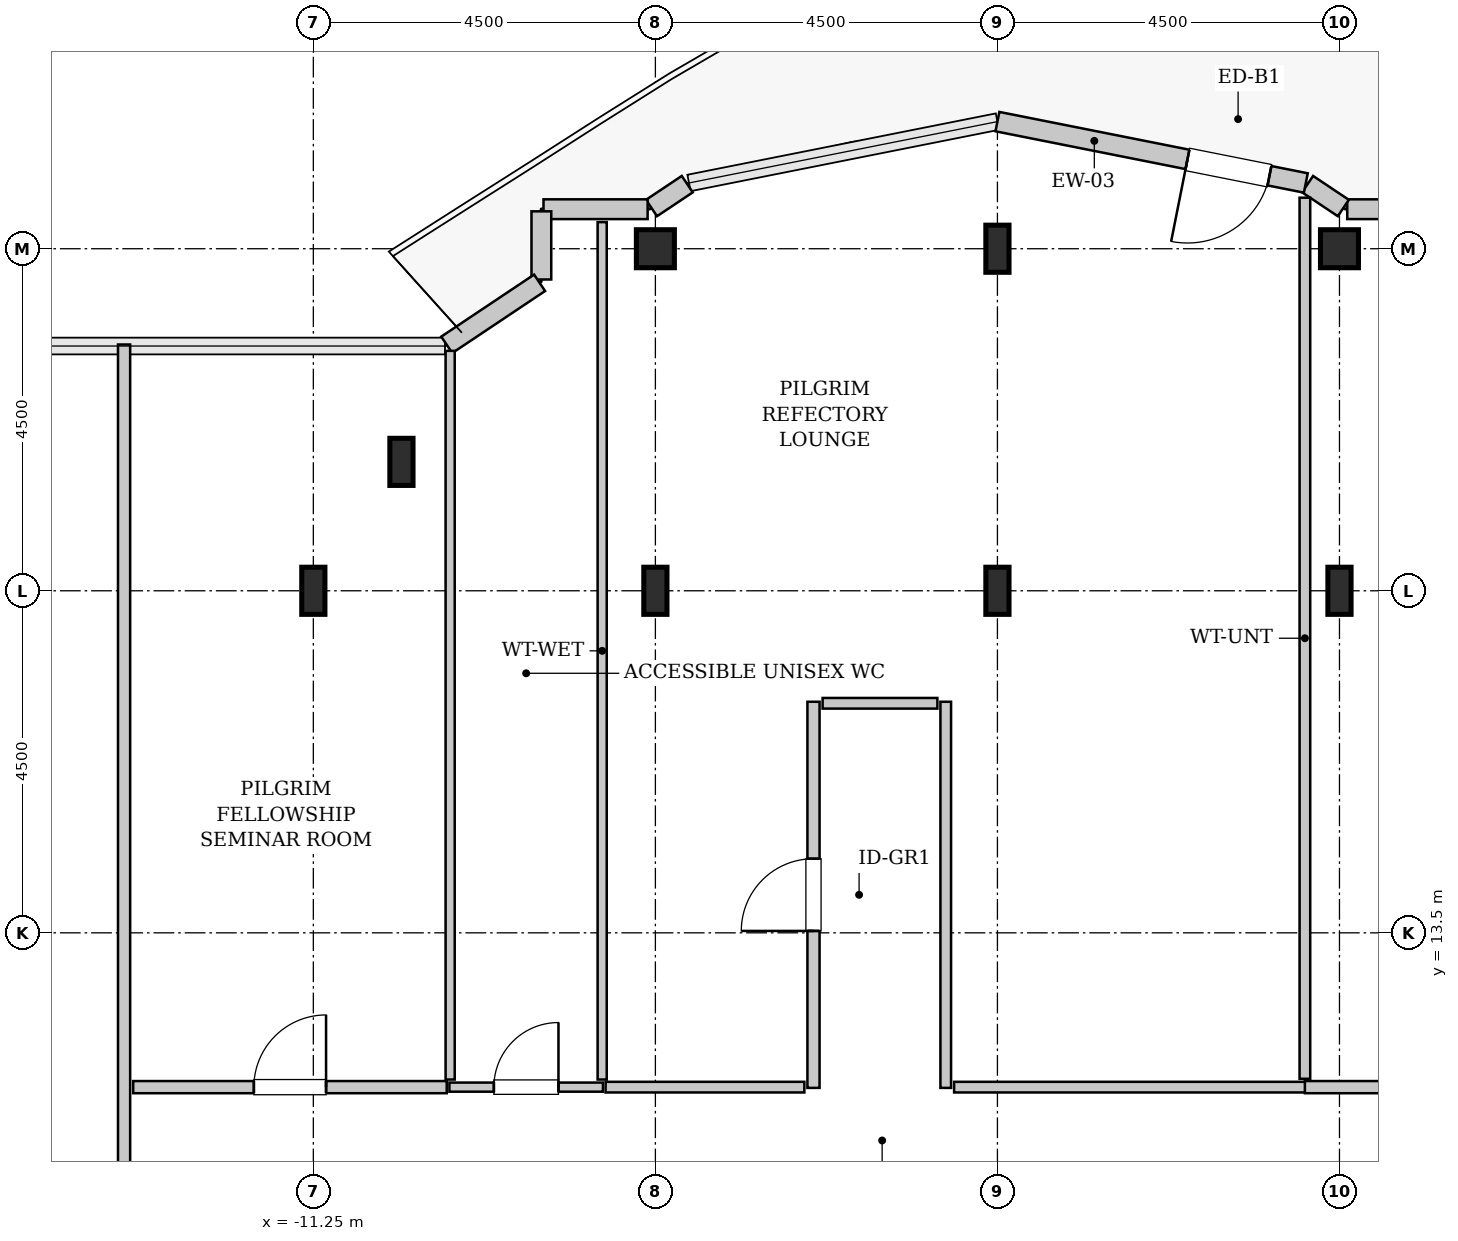
"""IFC4 building model, lengths in metres.
Left out: names, types, materials, properties, quantities, classifications, styles, units other than length and angle.
Written with IfcOpenShell. Run it as: python <this file> out.ifc"""

import sys

from ifc_helpers import new_model, si_unit, direction, frame, frame_2d, origin, origin_2d, place, context, subcontext, project, spatial, rectangle, hollow_rectangle, i_section, extrude, source, transform, mapped, element, fill, save


model = new_model("IFC4")
c1 = context("Model", 3, precision=1e-05, world=origin(), true_north=direction((0.0, 1.0)))
c2 = subcontext(c1, "Body", "Model", "MODEL_VIEW")
j1 = project(units=[si_unit("LENGTHUNIT", "METRE"), si_unit("PLANEANGLEUNIT", "RADIAN")], contexts=[c1])
p1 = place(None, origin())
s1 = spatial("IfcSite", under=j1, at=p1, CompositionType="ELEMENT")
p2 = place(p1, origin())
s2 = spatial("IfcBuilding", under=s1, at=p2, CompositionType="ELEMENT")
p3 = place(p2, frame((0.0, 0.0, 330.0)))
s3 = spatial("IfcBuildingStorey", under=s2, at=p3, CompositionType="ELEMENT", Elevation=330.0)
m1 = source(origin(), c2, "Body", "SweptSolid", [
    extrude(i_section(OverallWidth=0.305, OverallDepth=0.62, WebThickness=0.021, FlangeThickness=0.04, FilletRadius=0.027, at=origin_2d()), origin(), (0.0, 0.0, 1.0), 3.8),
])
for number, where, z_axis, x_axis in (
    (1, (-11.25, 18.0, 0.0), (0.0, 0.0, 1.0), (1.0, 0.0, 0.0)),
    (2, (-10.091, 19.696, 0.0), (0.0, 0.0, 1.0), (1.0, 0.0, 0.0)),
    (3, (-6.75, 18.0, 0.0), (0.0, 0.0, 1.0), (1.0, 0.0, 0.0)),
):
    element("IfcColumn", number, at=place(p3, frame(where, z_axis=z_axis, x_axis=x_axis)), inside=s3, PredefinedType="COLUMN", context=c2, shape_type="MappedRepresentation", body=[
        mapped(m1, transform((0.0, 0.0, 0.0), x_axis=(1.0, 0.0, 0.0), y_axis=(0.0, 1.0, 0.0), z_axis=(0.0, 0.0, 1.0), scale=1.0)),
    ])
m2 = source(origin(), c2, "Body", "SweptSolid", [
    extrude(hollow_rectangle(XDim=0.5, YDim=0.5, WallThickness=0.025, InnerFilletRadius=0.025, OuterFilletRadius=0.05, at=origin_2d()), origin(), (0.0, 0.0, 1.0), 3.8),
])
p4 = place(p3, frame((-6.75, 22.5, 0.0), z_axis=(0.0, 0.0, 1.0), x_axis=(1.0, 0.0, 0.0)))
e4 = element("IfcColumn", 4, at=p4, inside=s3, PredefinedType="COLUMN", context=c2, shape_type="MappedRepresentation", body=[
    mapped(m2, transform((0.0, 0.0, 0.0), x_axis=(1.0, 0.0, 0.0), y_axis=(0.0, 1.0, 0.0), z_axis=(0.0, 0.0, 1.0), scale=1.0)),
])
for number, where, z_axis, x_axis in (
    (5, (-2.25, 18.0, 0.0), (0.0, 0.0, 1.0), (1.0, 0.0, 0.0)),
    (6, (-2.25, 22.5, 0.0), (0.0, 0.0, 1.0), (1.0, 0.0, 0.0)),
    (7, (2.25, 18.0, 0.0), (0.0, 0.0, 1.0), (1.0, 0.0, 0.0)),
):
    element("IfcColumn", number, at=place(p3, frame(where, z_axis=z_axis, x_axis=x_axis)), inside=s3, PredefinedType="COLUMN", context=c2, shape_type="MappedRepresentation", body=[
        mapped(m1, transform((0.0, 0.0, 0.0), x_axis=(1.0, 0.0, 0.0), y_axis=(0.0, 1.0, 0.0), z_axis=(0.0, 0.0, 1.0), scale=1.0)),
    ])
p5 = place(p3, frame((2.25, 22.5, 0.0), z_axis=(0.0, 0.0, 1.0), x_axis=(1.0, 0.0, 0.0)))
e8 = element("IfcColumn", 8, at=p5, inside=s3, PredefinedType="COLUMN", context=c2, shape_type="MappedRepresentation", body=[
    mapped(m2, transform((0.0, 0.0, 0.0), x_axis=(1.0, 0.0, 0.0), y_axis=(0.0, 1.0, 0.0), z_axis=(0.0, 0.0, 1.0), scale=1.0)),
])
m3 = source(origin(), c2, "Body", "SweptSolid", [
    extrude(rectangle(XDim=1.37, YDim=0.26, at=frame_2d((0.685, 0.0))), origin(), (0.0, 0.0, 1.0), 3.55),
])
p6 = place(p3, frame((3.722, 23.02, 0.0), z_axis=(0.0, 0.0, 1.0), x_axis=(-1.0, 0.0, 0.0)))
e9 = element("IfcWall", 9, at=p6, inside=s3, PredefinedType="SOLIDWALL", context=c2, shape_type="MappedRepresentation", body=[
    mapped(m3, transform((0.0, 0.0, 0.0), x_axis=(1.0, 0.0, 0.0), y_axis=(0.0, 1.0, 0.0), z_axis=(0.0, 0.0, 1.0), scale=1.0)),
])
m4 = source(origin(), c2, "Body", "SweptSolid", [
    extrude(rectangle(XDim=0.565, YDim=0.26, at=frame_2d((0.283, 0.0))), origin(), (0.0, 0.0, 1.0), 3.55),
])
p7 = place(p3, frame((2.301, 23.036, 0.0), z_axis=(0.0, 0.0, 1.0), x_axis=(-0.831651492666, 0.555297933317, 0.0)))
e10 = element("IfcWall", 10, at=p7, inside=s3, PredefinedType="SOLIDWALL", context=c2, shape_type="MappedRepresentation", body=[
    mapped(m4, transform((0.0, 0.0, 0.0), x_axis=(1.0, 0.0, 0.0), y_axis=(0.0, 1.0, 0.0), z_axis=(0.0, 0.0, 1.0), scale=1.0)),
])
m5 = source(origin(), c2, "Body", "SweptSolid", [
    extrude(rectangle(XDim=4.137, YDim=0.26, at=frame_2d((2.068, 0.0))), origin(), (0.0, 0.0, 1.0), 3.55),
])
p8 = place(p3, frame((1.807, 23.365, 0.0), z_axis=(0.0, 0.0, 1.0), x_axis=(-0.980782170794, 0.195105954428, 0.0)))
e11 = element("IfcWall", 11, at=p8, inside=s3, PredefinedType="SOLIDWALL", context=c2, shape_type="MappedRepresentation", body=[
    mapped(m5, transform((0.0, 0.0, 0.0), x_axis=(1.0, 0.0, 0.0), y_axis=(0.0, 1.0, 0.0), z_axis=(0.0, 0.0, 1.0), scale=1.0)),
])
p9 = place(p8, frame((0.488, 0.0, 0.0)))
e12 = element("IfcOpeningElement", 12, at=p9, cuts=e11, PredefinedType="OPENING", context=c2, shape_type="SweptSolid", body=[
    extrude(rectangle(XDim=1.1, YDim=2.2, at=frame_2d((0.55, 1.1))), frame((0.0, 0.14, 0.0), z_axis=(0.0, -1.0, 0.0), x_axis=(1.0, 0.0, 0.0)), (0.0, 0.0, 1.0), 0.28),
])
p10 = place(p3, frame((-6.331, 23.35, 0.0), z_axis=(0.0, 0.0, 1.0), x_axis=(-0.831651492666, -0.555297933317, 0.0)))
e13 = element("IfcWall", 13, at=p10, inside=s3, PredefinedType="SOLIDWALL", context=c2, shape_type="MappedRepresentation", body=[
    mapped(m4, transform((0.0, 0.0, 0.0), x_axis=(1.0, 0.0, 0.0), y_axis=(0.0, 1.0, 0.0), z_axis=(0.0, 0.0, 1.0), scale=1.0)),
])
p11 = place(p3, frame((-6.852, 23.02, 0.0), z_axis=(0.0, 0.0, 1.0), x_axis=(-1.0, 0.0, 0.0)))
e14 = element("IfcWall", 14, at=p11, inside=s3, PredefinedType="SOLIDWALL", context=c2, shape_type="MappedRepresentation", body=[
    mapped(m3, transform((0.0, 0.0, 0.0), x_axis=(1.0, 0.0, 0.0), y_axis=(0.0, 1.0, 0.0), z_axis=(0.0, 0.0, 1.0), scale=1.0)),
])
m6 = source(origin(), c2, "Body", "SweptSolid", [
    extrude(rectangle(XDim=0.897, YDim=0.26, at=frame_2d((0.448, 0.0))), origin(), (0.0, 0.0, 1.0), 3.55),
])
p12 = place(p3, frame((-8.25, 22.992, 0.0), z_axis=(0.0, 0.0, 1.0), x_axis=(0.0, -1.0, 0.0)))
e15 = element("IfcWall", 15, at=p12, inside=s3, PredefinedType="SOLIDWALL", context=c2, shape_type="MappedRepresentation", body=[
    mapped(m6, transform((0.0, 0.0, 0.0), x_axis=(1.0, 0.0, 0.0), y_axis=(0.0, 1.0, 0.0), z_axis=(0.0, 0.0, 1.0), scale=1.0)),
])
m7 = source(origin(), c2, "Body", "SweptSolid", [
    extrude(rectangle(XDim=1.469, YDim=0.26, at=frame_2d((0.734, 0.0))), origin(), (0.0, 0.0, 1.0), 3.55),
])
p13 = place(p3, frame((-8.273, 22.052, 0.0), z_axis=(0.0, 0.0, 1.0), x_axis=(-0.831461760506, -0.555581983884, 0.0)))
e16 = element("IfcWall", 16, at=p13, inside=s3, PredefinedType="SOLIDWALL", context=c2, shape_type="MappedRepresentation", body=[
    mapped(m7, transform((0.0, 0.0, 0.0), x_axis=(1.0, 0.0, 0.0), y_axis=(0.0, 1.0, 0.0), z_axis=(0.0, 0.0, 1.0), scale=1.0)),
])
m8 = source(origin(), c2, "Body", "SweptSolid", [
    extrude(rectangle(XDim=2.02, YDim=0.12, at=frame_2d((1.01, 0.0))), origin(), (0.0, 0.0, 1.0), 3.535),
])
p14 = place(p3, frame((-9.46, 11.47, 0.0), z_axis=(0.0, 0.0, 1.0), x_axis=(1.0, 0.0, 0.0)))
e17 = element("IfcWall", 17, at=p14, inside=s3, PredefinedType="PLUMBINGWALL", context=c2, shape_type="MappedRepresentation", body=[
    mapped(m8, transform((0.0, 0.0, 0.0), x_axis=(1.0, 0.0, 0.0), y_axis=(0.0, 1.0, 0.0), z_axis=(0.0, 0.0, 1.0), scale=1.0)),
])
p15 = place(p14, frame((0.585, 0.0, 0.0)))
e18 = element("IfcOpeningElement", 18, at=p15, cuts=e17, PredefinedType="OPENING", context=c2, shape_type="SweptSolid", body=[
    extrude(rectangle(XDim=0.85, YDim=2.1, at=frame_2d((0.425, 1.05))), frame((0.0, 0.07, 0.0), z_axis=(0.0, -1.0, 0.0), x_axis=(1.0, 0.0, 0.0)), (0.0, 0.0, 1.0), 0.14),
])
m9 = source(origin(), c2, "Body", "SweptSolid", [
    extrude(rectangle(XDim=11.28, YDim=0.12, at=frame_2d((5.64, 0.0))), origin(), (0.0, 0.0, 1.0), 3.535),
])
p16 = place(p3, frame((-7.45, 11.57, 0.0), z_axis=(0.0, 0.0, 1.0), x_axis=(0.0, 1.0, 0.0)))
e19 = element("IfcWall", 19, at=p16, inside=s3, PredefinedType="PLUMBINGWALL", context=c2, shape_type="MappedRepresentation", body=[
    mapped(m9, transform((0.0, 0.0, 0.0), x_axis=(1.0, 0.0, 0.0), y_axis=(0.0, 1.0, 0.0), z_axis=(0.0, 0.0, 1.0), scale=1.0)),
])
m10 = source(origin(), c2, "Body", "SweptSolid", [
    extrude(rectangle(XDim=9.587, YDim=0.12, at=frame_2d((4.793, 0.0))), origin(), (0.0, 0.0, 1.0), 3.535),
])
p17 = place(p3, frame((-9.45, 11.57, 0.0), z_axis=(0.0, 0.0, 1.0), x_axis=(0.0, 1.0, 0.0)))
e20 = element("IfcWall", 20, at=p17, inside=s3, PredefinedType="PLUMBINGWALL", context=c2, shape_type="MappedRepresentation", body=[
    mapped(m10, transform((0.0, 0.0, 0.0), x_axis=(1.0, 0.0, 0.0), y_axis=(0.0, 1.0, 0.0), z_axis=(0.0, 0.0, 1.0), scale=1.0)),
])
m11 = source(origin(), c2, "Body", "SweptSolid", [
    extrude(rectangle(XDim=15.045, YDim=0.16, at=frame_2d((7.522, 0.0))), origin(), (0.0, 0.0, 1.0), 3.535),
])
p18 = place(p3, frame((-13.74, 6.195, 0.0), z_axis=(0.0, 0.0, 1.0), x_axis=(0.0, 1.0, 0.0)))
e21 = element("IfcWall", 21, at=p18, inside=s3, PredefinedType="PARTITIONING", context=c2, shape_type="MappedRepresentation", body=[
    mapped(m11, transform((0.0, 0.0, 0.0), x_axis=(1.0, 0.0, 0.0), y_axis=(0.0, 1.0, 0.0), z_axis=(0.0, 0.0, 1.0), scale=1.0)),
])
p19 = place(p18, frame((2.183, 0.0, 0.0)))
e22 = element("IfcOpeningElement", 22, at=p19, cuts=e21, PredefinedType="OPENING", context=c2, shape_type="SweptSolid", body=[
    extrude(rectangle(XDim=0.95, YDim=2.1, at=frame_2d((0.475, 1.05))), frame((0.0, 0.09, 0.0), z_axis=(0.0, -1.0, 0.0), x_axis=(1.0, 0.0, 0.0)), (0.0, 0.0, 1.0), 0.18),
])
m12 = source(origin(), c2, "Body", "SweptSolid", [
    extrude(rectangle(XDim=4.125, YDim=0.16, at=frame_2d((2.062, 0.0))), origin(), (0.0, 0.0, 1.0), 3.535),
])
p20 = place(p3, frame((-13.62, 11.47, 0.0), z_axis=(0.0, 0.0, 1.0), x_axis=(1.0, 0.0, 0.0)))
e23 = element("IfcWall", 23, at=p20, inside=s3, PredefinedType="PARTITIONING", context=c2, shape_type="MappedRepresentation", body=[
    mapped(m12, transform((0.0, 0.0, 0.0), x_axis=(1.0, 0.0, 0.0), y_axis=(0.0, 1.0, 0.0), z_axis=(0.0, 0.0, 1.0), scale=1.0)),
])
p21 = place(p20, frame((1.587, 0.0, 0.0)))
e24 = element("IfcOpeningElement", 24, at=p21, cuts=e23, PredefinedType="OPENING", context=c2, shape_type="SweptSolid", body=[
    extrude(rectangle(XDim=0.95, YDim=2.1, at=frame_2d((0.475, 1.05))), frame((0.0, 0.09, 0.0), z_axis=(0.0, -1.0, 0.0), x_axis=(1.0, 0.0, 0.0)), (0.0, 0.0, 1.0), 0.18),
])
m13 = source(origin(), c2, "Body", "SweptSolid", [
    extrude(rectangle(XDim=5.08, YDim=0.16, at=frame_2d((2.54, 0.0))), origin(), (0.0, 0.0, 1.0), 3.535),
])
p22 = place(p3, frame((-4.67, 11.46, 0.0), z_axis=(0.0, 0.0, 1.0), x_axis=(0.0, 1.0, 0.0)))
e25 = element("IfcWall", 25, at=p22, inside=s3, PredefinedType="PARTITIONING", context=c2, shape_type="MappedRepresentation", body=[
    mapped(m13, transform((0.0, 0.0, 0.0), x_axis=(1.0, 0.0, 0.0), y_axis=(0.0, 1.0, 0.0), z_axis=(0.0, 0.0, 1.0), scale=1.0)),
])
p23 = place(p22, frame((2.065, 0.0, 0.0)))
e26 = element("IfcOpeningElement", 26, at=p23, cuts=e25, PredefinedType="OPENING", context=c2, shape_type="SweptSolid", body=[
    extrude(rectangle(XDim=0.95, YDim=2.1, at=frame_2d((0.475, 1.05))), frame((0.0, 0.09, 0.0), z_axis=(0.0, -1.0, 0.0), x_axis=(1.0, 0.0, 0.0)), (0.0, 0.0, 1.0), 0.18),
])
m14 = source(origin(), c2, "Body", "SweptSolid", [
    extrude(rectangle(XDim=5.08, YDim=0.14, at=frame_2d((2.54, 0.0))), origin(), (0.0, 0.0, 1.0), 3.535),
])
p24 = place(p3, frame((-2.93, 11.46, 0.0), z_axis=(0.0, 0.0, 1.0), x_axis=(0.0, 1.0, 0.0)))
e27 = element("IfcWall", 27, at=p24, inside=s3, PredefinedType="PARTITIONING", context=c2, shape_type="MappedRepresentation", body=[
    mapped(m14, transform((0.0, 0.0, 0.0), x_axis=(1.0, 0.0, 0.0), y_axis=(0.0, 1.0, 0.0), z_axis=(0.0, 0.0, 1.0), scale=1.0)),
])
m15 = source(origin(), c2, "Body", "SweptSolid", [
    extrude(rectangle(XDim=4.625, YDim=0.14, at=frame_2d((2.312, 0.0))), origin(), (0.0, 0.0, 1.0), 3.535),
])
p25 = place(p3, frame((-2.82, 11.47, 0.0), z_axis=(0.0, 0.0, 1.0), x_axis=(1.0, 0.0, 0.0)))
e28 = element("IfcWall", 28, at=p25, inside=s3, PredefinedType="PARTITIONING", context=c2, shape_type="MappedRepresentation", body=[
    mapped(m15, transform((0.0, 0.0, 0.0), x_axis=(1.0, 0.0, 0.0), y_axis=(0.0, 1.0, 0.0), z_axis=(0.0, 0.0, 1.0), scale=1.0)),
])
m16 = source(origin(), c2, "Body", "SweptSolid", [
    extrude(rectangle(XDim=2.615, YDim=0.14, at=frame_2d((1.308, 0.0))), origin(), (0.0, 0.0, 1.0), 3.535),
])
p26 = place(p3, frame((-7.405, 11.47, 0.0), z_axis=(0.0, 0.0, 1.0), x_axis=(1.0, 0.0, 0.0)))
e29 = element("IfcWall", 29, at=p26, inside=s3, PredefinedType="PARTITIONING", context=c2, shape_type="MappedRepresentation", body=[
    mapped(m16, transform((0.0, 0.0, 0.0), x_axis=(1.0, 0.0, 0.0), y_axis=(0.0, 1.0, 0.0), z_axis=(0.0, 0.0, 1.0), scale=1.0)),
])
m17 = source(origin(), c2, "Body", "SweptSolid", [
    extrude(rectangle(XDim=1.51, YDim=0.14, at=frame_2d((0.755, 0.0))), origin(), (0.0, 0.0, 1.0), 3.535),
])
p27 = place(p3, frame((-4.55, 16.52, 0.0), z_axis=(0.0, 0.0, 1.0), x_axis=(1.0, 0.0, 0.0)))
e30 = element("IfcWall", 30, at=p27, inside=s3, PredefinedType="PARTITIONING", context=c2, shape_type="MappedRepresentation", body=[
    mapped(m17, transform((0.0, 0.0, 0.0), x_axis=(1.0, 0.0, 0.0), y_axis=(0.0, 1.0, 0.0), z_axis=(0.0, 0.0, 1.0), scale=1.0)),
])
m18 = source(origin(), c2, "Body", "SweptSolid", [
    extrude(rectangle(XDim=11.591, YDim=0.14, at=frame_2d((5.796, 0.0))), origin(), (0.0, 0.0, 1.0), 2.975),
])
p28 = place(p3, frame((1.795, 11.58, 0.0), z_axis=(0.0, 0.0, 1.0), x_axis=(0.0, 1.0, 0.0)))
e31 = element("IfcWall", 31, at=p28, inside=s3, PredefinedType="PARTITIONING", context=c2, shape_type="MappedRepresentation", body=[
    mapped(m18, transform((0.0, 0.0, 0.0), x_axis=(1.0, 0.0, 0.0), y_axis=(0.0, 1.0, 0.0), z_axis=(0.0, 0.0, 1.0), scale=1.0)),
])
m19 = source(origin(), c2, "Body", "SweptSolid", [
    extrude(rectangle(XDim=5.965, YDim=0.16, at=frame_2d((2.982, 0.0))), origin(), (0.0, 0.0, 1.0), 3.535),
])
p29 = place(p3, frame((1.795, 11.47, 0.0), z_axis=(0.0, 0.0, 1.0), x_axis=(1.0, 0.0, 0.0)))
e32 = element("IfcWall", 32, at=p29, inside=s3, PredefinedType="PARTITIONING", context=c2, shape_type="MappedRepresentation", body=[
    mapped(m19, transform((0.0, 0.0, 0.0), x_axis=(1.0, 0.0, 0.0), y_axis=(0.0, 1.0, 0.0), z_axis=(0.0, 0.0, 1.0), scale=1.0)),
])
p30 = place(p29, frame((2.508, 0.0, 0.0)))
e33 = element("IfcOpeningElement", 33, at=p30, cuts=e32, PredefinedType="OPENING", context=c2, shape_type="SweptSolid", body=[
    extrude(rectangle(XDim=0.95, YDim=2.1, at=frame_2d((0.475, 1.05))), frame((0.0, 0.09, 0.0), z_axis=(0.0, -1.0, 0.0), x_axis=(1.0, 0.0, 0.0)), (0.0, 0.0, 1.0), 0.18),
])
m20 = source(origin(), c2, "Body", "SweptSolid", [
    extrude(rectangle(XDim=1.1, YDim=2.2, at=frame_2d((0.55, 1.1))), frame((0.0, 0.025, 0.0), z_axis=(0.0, -1.0, 0.0), x_axis=(1.0, 0.0, 0.0)), (0.0, 0.0, 1.0), 0.05),
])
p31 = place(p9, origin())
e34 = element("IfcDoor", 34, at=p31, inside=s3, OperationType="SINGLE_SWING_RIGHT", PredefinedType="DOOR", context=c2, shape_type="MappedRepresentation", body=[
    mapped(m20, transform((0.0, 0.0, 0.0), x_axis=(1.0, 0.0, 0.0), y_axis=(0.0, 1.0, 0.0), z_axis=(0.0, 0.0, 1.0), scale=1.0)),
])
fill(e12, e34)
m21 = source(origin(), c2, "Body", "SweptSolid", [
    extrude(rectangle(XDim=0.85, YDim=2.1, at=frame_2d((0.425, 1.05))), frame((0.0, 0.025, 0.0), z_axis=(0.0, -1.0, 0.0), x_axis=(1.0, 0.0, 0.0)), (0.0, 0.0, 1.0), 0.05),
])
p32 = place(p15, origin())
e35 = element("IfcDoor", 35, at=p32, inside=s3, OperationType="SINGLE_SWING_RIGHT", PredefinedType="DOOR", context=c2, shape_type="MappedRepresentation", body=[
    mapped(m21, transform((0.0, 0.0, 0.0), x_axis=(1.0, 0.0, 0.0), y_axis=(0.0, 1.0, 0.0), z_axis=(0.0, 0.0, 1.0), scale=1.0)),
])
fill(e18, e35)
m22 = source(origin(), c2, "Body", "SweptSolid", [
    extrude(rectangle(XDim=0.95, YDim=2.1, at=frame_2d((0.475, 1.05))), frame((0.0, 0.025, 0.0), z_axis=(0.0, -1.0, 0.0), x_axis=(1.0, 0.0, 0.0)), (0.0, 0.0, 1.0), 0.05),
])
p33 = place(p21, origin())
e36 = element("IfcDoor", 36, at=p33, inside=s3, OperationType="SINGLE_SWING_RIGHT", PredefinedType="DOOR", context=c2, shape_type="MappedRepresentation", body=[
    mapped(m22, transform((0.0, 0.0, 0.0), x_axis=(1.0, 0.0, 0.0), y_axis=(0.0, 1.0, 0.0), z_axis=(0.0, 0.0, 1.0), scale=1.0)),
])
fill(e24, e36)
p34 = place(p23, origin())
e37 = element("IfcDoor", 37, at=p34, inside=s3, OperationType="SINGLE_SWING_LEFT", PredefinedType="DOOR", context=c2, shape_type="MappedRepresentation", body=[
    mapped(m22, transform((0.0, 0.0, 0.0), x_axis=(1.0, 0.0, 0.0), y_axis=(0.0, 1.0, 0.0), z_axis=(0.0, 0.0, 1.0), scale=1.0)),
])
fill(e26, e37)
save(model, sys.argv[1])
